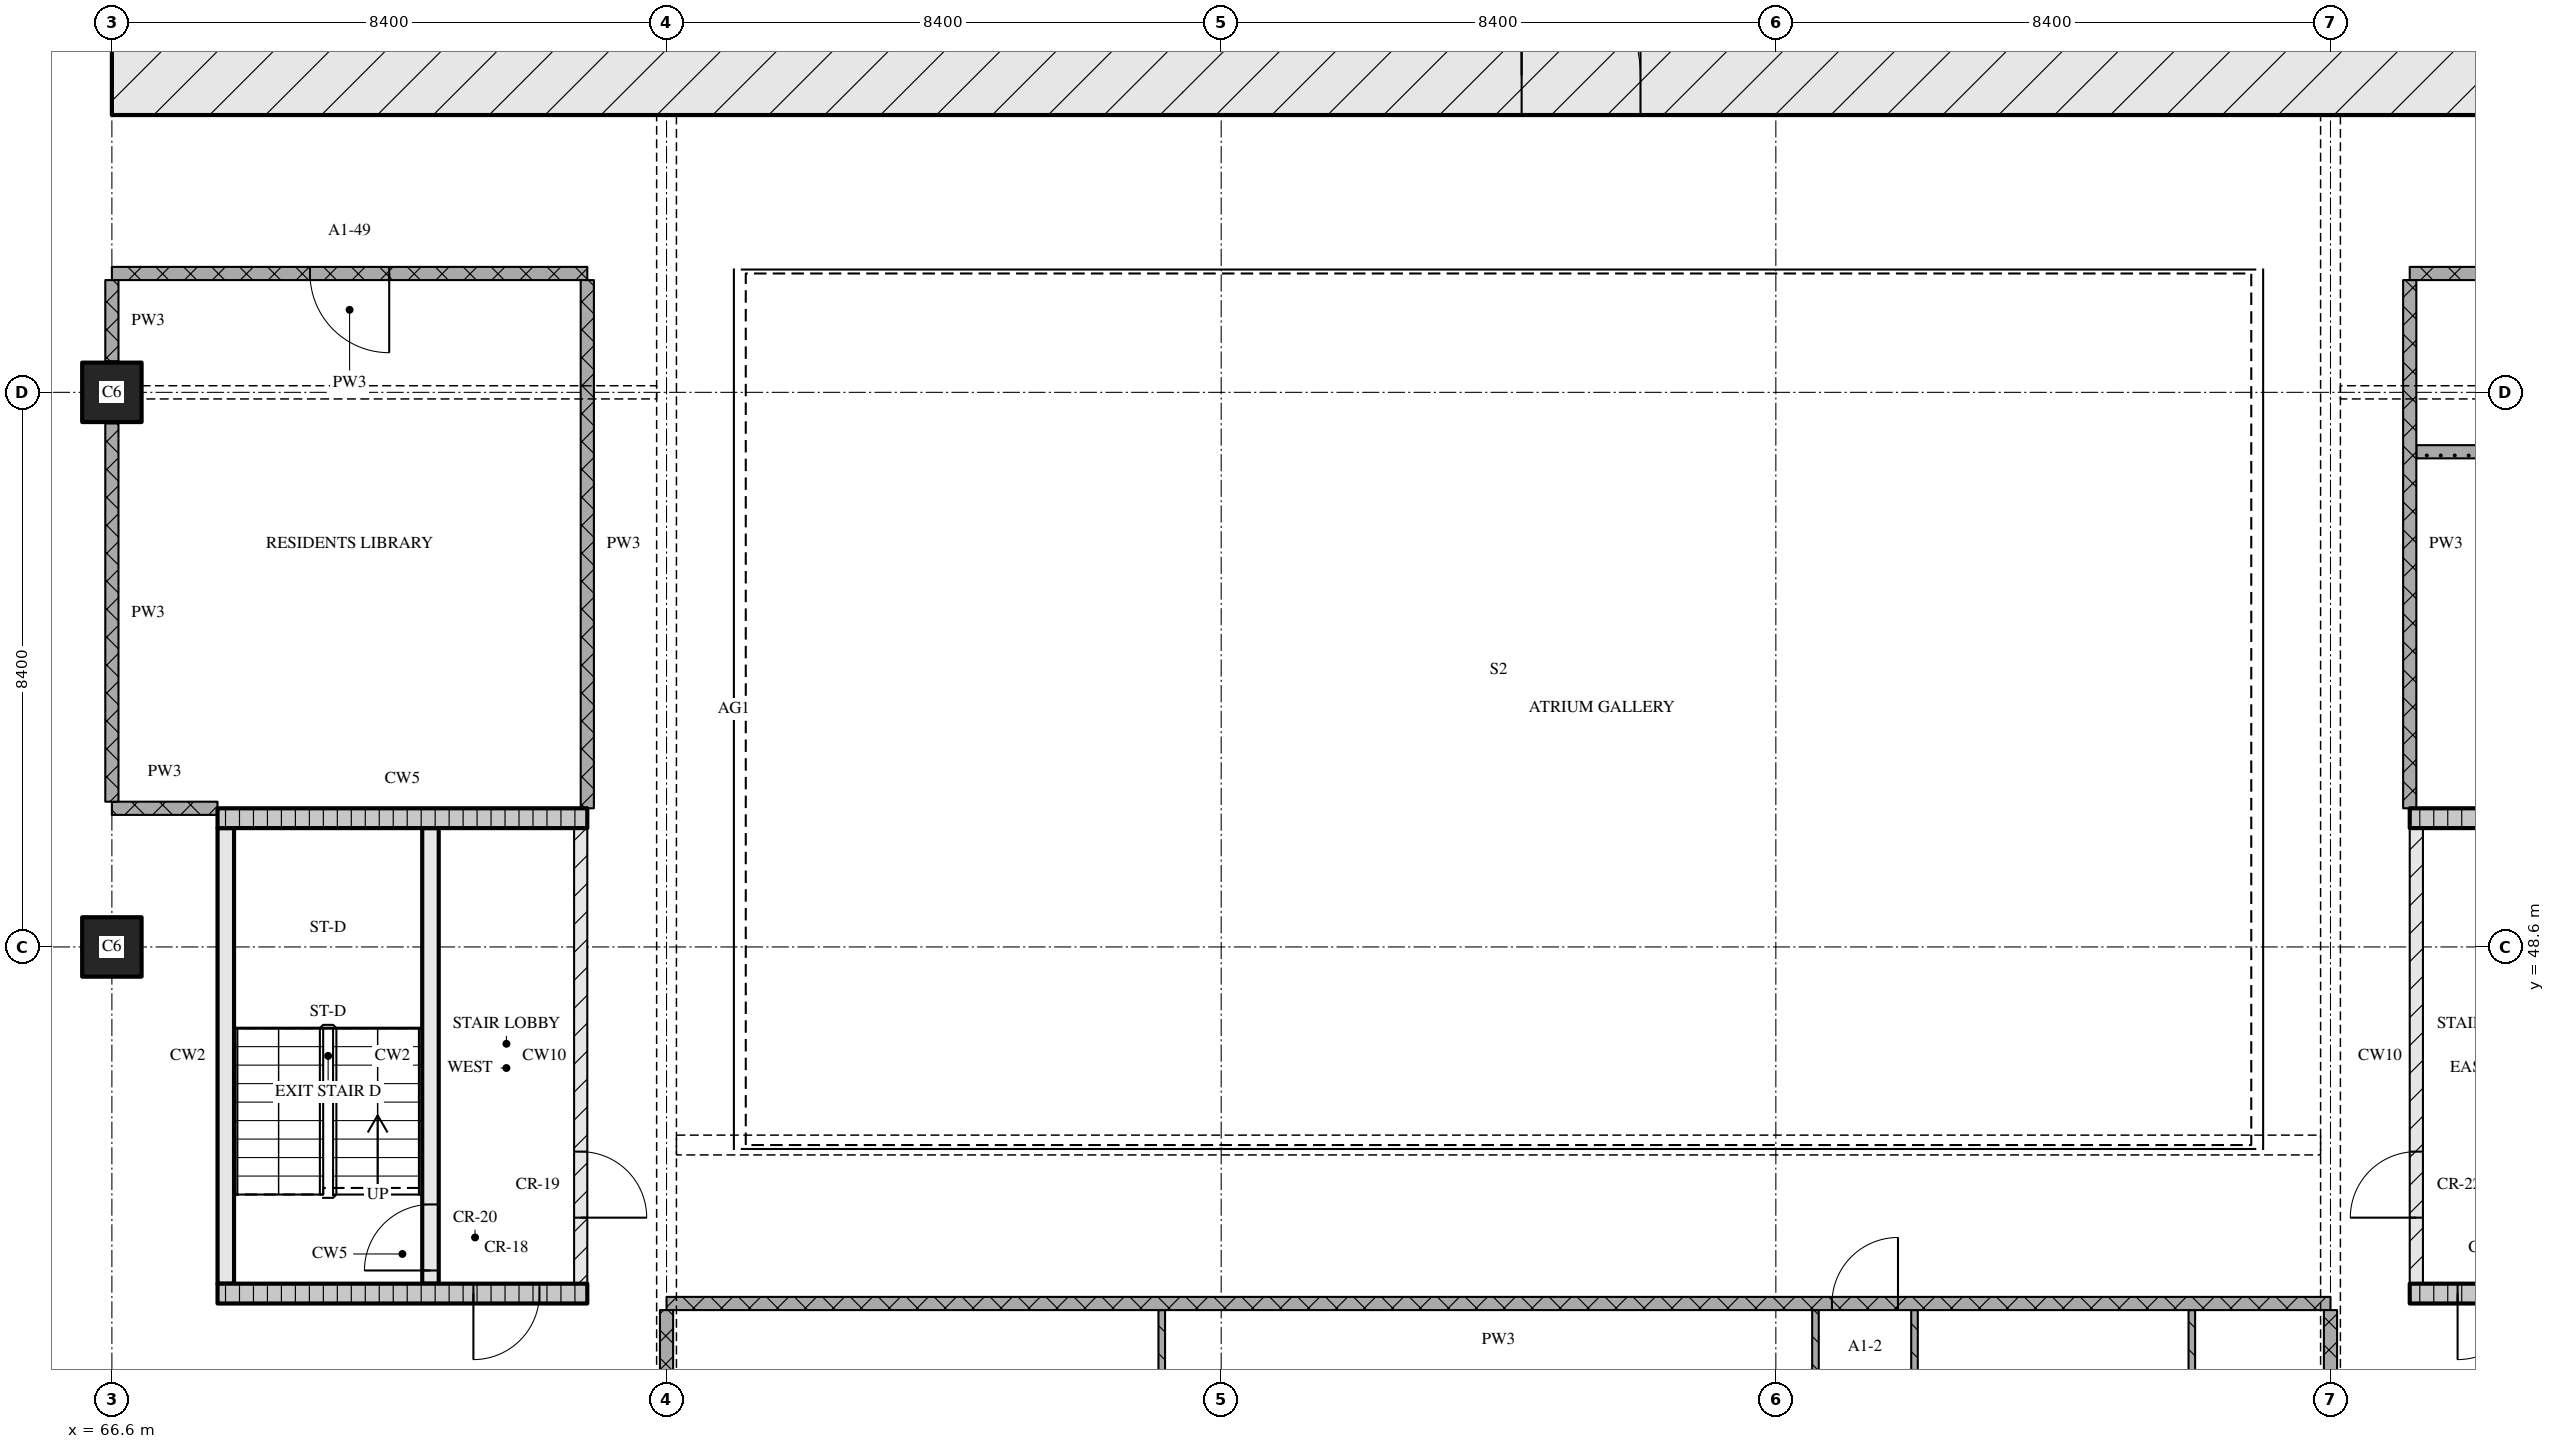
"""IFC4 building model, lengths in metres.
Left out: names, types, materials, properties, quantities, classifications, styles, units other than length and angle.
Written with IfcOpenShell. Run it as: python <this file> out.ifc"""

import sys

from ifc_helpers import new_model, si_unit, direction, frame, frame_2d, origin, origin_2d, place, context, subcontext, project, spatial, rectangle, extrude, element, fill, save


model = new_model("IFC4")
c1 = context("Model", 3, precision=1e-05, world=origin(), true_north=direction((0.0, 1.0)))
c2 = subcontext(c1, "Body", "Model", "MODEL_VIEW")
j1 = project(units=[si_unit("LENGTHUNIT", "METRE"), si_unit("PLANEANGLEUNIT", "RADIAN")], contexts=[c1])
p1 = place(None, origin())
s1 = spatial("IfcSite", under=j1, at=p1, CompositionType="ELEMENT")
p2 = place(p1, origin())
s2 = spatial("IfcBuilding", under=s1, at=p2, CompositionType="ELEMENT")
p3 = place(p2, frame((0.0, 0.0, 40.8)))
s3 = spatial("IfcBuildingStorey", under=s2, at=p3, CompositionType="ELEMENT", Elevation=40.8)
for number, where, z_axis, x_axis in (
    (1, (66.6, 48.6, 0.0), (0.0, 0.0, 1.0), (1.0, 0.0, 0.0)),
    (2, (66.6, 57.0, 0.0), (0.0, 0.0, 1.0), (1.0, 0.0, 0.0)),
):
    element("IfcColumn", number, at=place(p3, frame(where, z_axis=z_axis, x_axis=x_axis)), inside=s3, PredefinedType="COLUMN", context=c2, shape_type="SweptSolid", body=[
        extrude(rectangle(XDim=0.9, YDim=0.9, at=origin_2d()), origin(), (0.0, 0.0, 1.0), 3.6),
    ])
p4 = place(p3, frame((66.6, 61.8, 0.0), z_axis=(0.0, 0.0, 1.0), x_axis=(1.0, 0.0, 0.0)))
e3 = element("IfcWall", 3, at=p4, inside=s3, PredefinedType="SOLIDWALL", context=c2, shape_type="SweptSolid", body=[
    extrude(rectangle(XDim=42.0, YDim=1.2, at=frame_2d((21.0, 0.0))), origin(), (0.0, 0.0, 1.0), 3.32),
])
p5 = place(p4, frame((21.35, 0.0, 0.0)))
e4 = element("IfcOpeningElement", 4, at=p5, cuts=e3, PredefinedType="OPENING", context=c2, shape_type="SweptSolid", body=[
    extrude(rectangle(XDim=1.8, YDim=2.1, at=frame_2d((0.9, 1.05))), frame((0.0, 0.61, 0.0), z_axis=(0.0, -1.0, 0.0), x_axis=(1.0, 0.0, 0.0)), (0.0, 0.0, 1.0), 1.22),
])
p6 = place(p3, frame((68.2, 43.35, 0.0), z_axis=(0.0, 0.0, 1.0), x_axis=(1.0, 0.0, 0.0)))
e5 = element("IfcWall", 5, at=p6, inside=s3, PredefinedType="SOLIDWALL", context=c2, shape_type="SweptSolid", body=[
    extrude(rectangle(XDim=5.6, YDim=0.3, at=frame_2d((2.8, 0.0))), origin(), (0.0, 0.0, 1.0), 3.32),
])
p7 = place(p6, frame((3.875, 0.0, 0.0)))
e6 = element("IfcOpeningElement", 6, at=p7, cuts=e5, PredefinedType="OPENING", context=c2, shape_type="SweptSolid", body=[
    extrude(rectangle(XDim=1.0, YDim=2.1, at=frame_2d((0.5, 1.05))), frame((0.0, 0.16, 0.0), z_axis=(0.0, -1.0, 0.0), x_axis=(1.0, 0.0, 0.0)), (0.0, 0.0, 1.0), 0.32),
])
p8 = place(p3, frame((68.325, 43.5, 0.0), z_axis=(0.0, 0.0, 1.0), x_axis=(0.0, 1.0, 0.0)))
e7 = element("IfcWall", 7, at=p8, inside=s3, PredefinedType="SOLIDWALL", context=c2, shape_type="SweptSolid", body=[
    extrude(rectangle(XDim=6.9, YDim=0.25, at=frame_2d((3.45, 0.0))), origin(), (0.0, 0.0, 1.0), 3.32),
])
p9 = place(p3, frame((71.425, 43.5, 0.0), z_axis=(0.0, 0.0, 1.0), x_axis=(0.0, 1.0, 0.0)))
e8 = element("IfcWall", 8, at=p9, inside=s3, PredefinedType="SOLIDWALL", context=c2, shape_type="SweptSolid", body=[
    extrude(rectangle(XDim=6.9, YDim=0.25, at=frame_2d((3.45, 0.0))), origin(), (0.0, 0.0, 1.0), 3.32),
])
p10 = place(p9, frame((0.2, 0.0, 0.0)))
e9 = element("IfcOpeningElement", 9, at=p10, cuts=e8, PredefinedType="OPENING", context=c2, shape_type="SweptSolid", body=[
    extrude(rectangle(XDim=1.0, YDim=2.1, at=frame_2d((0.5, 1.05))), frame((0.0, 0.135, 0.0), z_axis=(0.0, -1.0, 0.0), x_axis=(1.0, 0.0, 0.0)), (0.0, 0.0, 1.0), 0.27),
])
p11 = place(p3, frame((73.7, 43.5, 0.0), z_axis=(0.0, 0.0, 1.0), x_axis=(0.0, 1.0, 0.0)))
e10 = element("IfcWall", 10, at=p11, inside=s3, PredefinedType="PARTITIONING", context=c2, shape_type="SweptSolid", body=[
    extrude(rectangle(XDim=6.9, YDim=0.2, at=frame_2d((3.45, 0.0))), origin(), (0.0, 0.0, 1.0), 3.32),
])
p12 = place(p11, frame((1.0, 0.0, 0.0)))
e11 = element("IfcOpeningElement", 11, at=p12, cuts=e10, PredefinedType="OPENING", context=c2, shape_type="SweptSolid", body=[
    extrude(rectangle(XDim=1.0, YDim=2.1, at=frame_2d((0.5, 1.05))), frame((0.0, 0.11, 0.0), z_axis=(0.0, -1.0, 0.0), x_axis=(1.0, 0.0, 0.0)), (0.0, 0.0, 1.0), 0.22),
])
p13 = place(p3, frame((68.2, 50.55, 0.0), z_axis=(0.0, 0.0, 1.0), x_axis=(1.0, 0.0, 0.0)))
e12 = element("IfcWall", 12, at=p13, inside=s3, PredefinedType="SOLIDWALL", context=c2, shape_type="SweptSolid", body=[
    extrude(rectangle(XDim=5.6, YDim=0.3, at=frame_2d((2.8, 0.0))), origin(), (0.0, 0.0, 1.0), 3.32),
])
p14 = place(p3, frame((101.4, 43.35, 0.0), z_axis=(0.0, 0.0, 1.0), x_axis=(1.0, 0.0, 0.0)))
e13 = element("IfcWall", 13, at=p14, inside=s3, PredefinedType="SOLIDWALL", context=c2, shape_type="SweptSolid", body=[
    extrude(rectangle(XDim=5.6, YDim=0.3, at=frame_2d((2.8, 0.0))), origin(), (0.0, 0.0, 1.0), 3.32),
])
p15 = place(p14, frame((0.725, 0.0, 0.0)))
e14 = element("IfcOpeningElement", 14, at=p15, cuts=e13, PredefinedType="OPENING", context=c2, shape_type="SweptSolid", body=[
    extrude(rectangle(XDim=1.0, YDim=2.1, at=frame_2d((0.5, 1.05))), frame((0.0, 0.16, 0.0), z_axis=(0.0, -1.0, 0.0), x_axis=(1.0, 0.0, 0.0)), (0.0, 0.0, 1.0), 0.32),
])
p16 = place(p3, frame((101.5, 43.5, 0.0), z_axis=(0.0, 0.0, 1.0), x_axis=(0.0, 1.0, 0.0)))
e15 = element("IfcWall", 15, at=p16, inside=s3, PredefinedType="PARTITIONING", context=c2, shape_type="SweptSolid", body=[
    extrude(rectangle(XDim=6.9, YDim=0.2, at=frame_2d((3.45, 0.0))), origin(), (0.0, 0.0, 1.0), 3.32),
])
p17 = place(p16, frame((1.0, 0.0, 0.0)))
e16 = element("IfcOpeningElement", 16, at=p17, cuts=e15, PredefinedType="OPENING", context=c2, shape_type="SweptSolid", body=[
    extrude(rectangle(XDim=1.0, YDim=2.1, at=frame_2d((0.5, 1.05))), frame((0.0, 0.11, 0.0), z_axis=(0.0, -1.0, 0.0), x_axis=(1.0, 0.0, 0.0)), (0.0, 0.0, 1.0), 0.22),
])
p18 = place(p3, frame((101.4, 50.55, 0.0), z_axis=(0.0, 0.0, 1.0), x_axis=(1.0, 0.0, 0.0)))
e17 = element("IfcWall", 17, at=p18, inside=s3, PredefinedType="SOLIDWALL", context=c2, shape_type="SweptSolid", body=[
    extrude(rectangle(XDim=5.6, YDim=0.3, at=frame_2d((2.8, 0.0))), origin(), (0.0, 0.0, 1.0), 3.32),
])
p19 = place(p3, frame((100.2, 43.2, 0.0), z_axis=(0.0, 0.0, 1.0), x_axis=(-1.0, 0.0, 0.0)))
e18 = element("IfcWall", 18, at=p19, inside=s3, PredefinedType="PARTITIONING", context=c2, shape_type="SweptSolid", body=[
    extrude(rectangle(XDim=25.2, YDim=0.2, at=frame_2d((12.6, 0.0))), origin(), (0.0, 0.0, 1.0), 3.32),
])
p20 = place(p19, frame((6.55, 0.0, 0.0)))
e19 = element("IfcOpeningElement", 19, at=p20, cuts=e18, PredefinedType="OPENING", context=c2, shape_type="SweptSolid", body=[
    extrude(rectangle(XDim=1.0, YDim=2.1, at=frame_2d((0.5, 1.05))), frame((0.0, 0.11, 0.0), z_axis=(0.0, -1.0, 0.0), x_axis=(1.0, 0.0, 0.0)), (0.0, 0.0, 1.0), 0.22),
])
p21 = place(p3, frame((66.6, 50.7, 0.0), z_axis=(0.0, 0.0, 1.0), x_axis=(1.0, 0.0, 0.0)))
e20 = element("IfcWall", 20, at=p21, inside=s3, PredefinedType="PARTITIONING", context=c2, shape_type="SweptSolid", body=[
    extrude(rectangle(XDim=1.6, YDim=0.2, at=frame_2d((0.8, 0.0))), origin(), (0.0, 0.0, 1.0), 3.32),
])
p22 = place(p3, frame((101.5, 56.1, 0.0), z_axis=(0.0, 0.0, 1.0), x_axis=(1.0, 0.0, 0.0)))
e21 = element("IfcWall", 21, at=p22, inside=s3, PredefinedType="PARTITIONING", context=c2, shape_type="SweptSolid", body=[
    extrude(rectangle(XDim=7.0, YDim=0.2, at=frame_2d((3.5, 0.0))), origin(), (0.0, 0.0, 1.0), 3.32),
])
p23 = place(p3, frame((73.8, 58.8, 0.0), z_axis=(0.0, 0.0, 1.0), x_axis=(-1.0, 0.0, 0.0)))
e22 = element("IfcWall", 22, at=p23, inside=s3, PredefinedType="PARTITIONING", context=c2, shape_type="SweptSolid", body=[
    extrude(rectangle(XDim=7.2, YDim=0.2, at=frame_2d((3.6, 0.0))), origin(), (0.0, 0.0, 1.0), 3.32),
])
p24 = place(p23, frame((3.0, 0.0, 0.0)))
e23 = element("IfcOpeningElement", 23, at=p24, cuts=e22, PredefinedType="OPENING", context=c2, shape_type="SweptSolid", body=[
    extrude(rectangle(XDim=1.2, YDim=2.1, at=frame_2d((0.6, 1.05))), frame((0.0, 0.11, 0.0), z_axis=(0.0, -1.0, 0.0), x_axis=(1.0, 0.0, 0.0)), (0.0, 0.0, 1.0), 0.22),
])
p25 = place(p3, frame((101.4, 58.8, 0.0), z_axis=(0.0, 0.0, 1.0), x_axis=(1.0, 0.0, 0.0)))
e24 = element("IfcWall", 24, at=p25, inside=s3, PredefinedType="PARTITIONING", context=c2, shape_type="SweptSolid", body=[
    extrude(rectangle(XDim=7.2, YDim=0.2, at=frame_2d((3.6, 0.0))), origin(), (0.0, 0.0, 1.0), 3.32),
])
p26 = place(p3, frame((66.6, 56.53, 0.0), z_axis=(0.0, 0.0, 1.0), x_axis=(0.0, -1.0, 0.0)))
e25 = element("IfcWall", 25, at=p26, inside=s3, PredefinedType="PARTITIONING", context=c2, shape_type="SweptSolid", body=[
    extrude(rectangle(XDim=5.73, YDim=0.2, at=frame_2d((2.865, 0.0))), origin(), (0.0, 0.0, 1.0), 3.32),
])
p27 = place(p3, frame((66.6, 58.7, 0.0), z_axis=(0.0, 0.0, 1.0), x_axis=(0.0, -1.0, 0.0)))
e26 = element("IfcWall", 26, at=p27, inside=s3, PredefinedType="PARTITIONING", context=c2, shape_type="SweptSolid", body=[
    extrude(rectangle(XDim=1.23, YDim=0.2, at=frame_2d((0.615, 0.0))), origin(), (0.0, 0.0, 1.0), 3.32),
])
p28 = place(p3, frame((73.8, 58.7, 0.0), z_axis=(0.0, 0.0, 1.0), x_axis=(0.0, -1.0, 0.0)))
e27 = element("IfcWall", 27, at=p28, inside=s3, PredefinedType="PARTITIONING", context=c2, shape_type="SweptSolid", body=[
    extrude(rectangle(XDim=8.0, YDim=0.2, at=frame_2d((4.0, 0.0))), origin(), (0.0, 0.0, 1.0), 3.32),
])
p29 = place(p3, frame((75.0, 43.1, 0.0), z_axis=(0.0, 0.0, 1.0), x_axis=(0.0, -1.0, 0.0)))
e28 = element("IfcWall", 28, at=p29, inside=s3, PredefinedType="PARTITIONING", context=c2, shape_type="SweptSolid", body=[
    extrude(rectangle(XDim=2.2, YDim=0.2, at=frame_2d((1.1, 0.0))), origin(), (0.0, 0.0, 1.0), 2.43),
])
p30 = place(p3, frame((82.5, 43.1, 0.0), z_axis=(0.0, 0.0, 1.0), x_axis=(0.0, -1.0, 0.0)))
e29 = element("IfcWall", 29, at=p30, inside=s3, PredefinedType="PARTITIONING", context=c2, shape_type="SweptSolid", body=[
    extrude(rectangle(XDim=4.35, YDim=0.1, at=frame_2d((2.175, 0.0))), origin(), (0.0, 0.0, 1.0), 3.32),
])
p31 = place(p3, frame((92.4, 38.75, 0.0), z_axis=(0.0, 0.0, 1.0), x_axis=(0.0, 1.0, 0.0)))
e30 = element("IfcWall", 30, at=p31, inside=s3, PredefinedType="PARTITIONING", context=c2, shape_type="SweptSolid", body=[
    extrude(rectangle(XDim=4.35, YDim=0.1, at=frame_2d((2.175, 0.0))), origin(), (0.0, 0.0, 1.0), 3.32),
])
p32 = place(p31, frame((2.05, 0.0, 0.0)))
e31 = element("IfcOpeningElement", 31, at=p32, cuts=e30, PredefinedType="OPENING", context=c2, shape_type="SweptSolid", body=[
    extrude(rectangle(XDim=0.9, YDim=2.1, at=frame_2d((0.45, 1.05))), frame((0.0, 0.06, 0.0), z_axis=(0.0, -1.0, 0.0), x_axis=(1.0, 0.0, 0.0)), (0.0, 0.0, 1.0), 0.12),
])
p33 = place(p3, frame((93.9, 43.1, 0.0), z_axis=(0.0, 0.0, 1.0), x_axis=(0.0, -1.0, 0.0)))
e32 = element("IfcWall", 32, at=p33, inside=s3, PredefinedType="PARTITIONING", context=c2, shape_type="SweptSolid", body=[
    extrude(rectangle(XDim=4.35, YDim=0.1, at=frame_2d((2.175, 0.0))), origin(), (0.0, 0.0, 1.0), 3.32),
])
p34 = place(p33, frame((1.75, 0.0, 0.0)))
e33 = element("IfcOpeningElement", 33, at=p34, cuts=e32, PredefinedType="OPENING", context=c2, shape_type="SweptSolid", body=[
    extrude(rectangle(XDim=0.8, YDim=2.1, at=frame_2d((0.4, 1.05))), frame((0.0, 0.06, 0.0), z_axis=(0.0, -1.0, 0.0), x_axis=(1.0, 0.0, 0.0)), (0.0, 0.0, 1.0), 0.12),
])
p35 = place(p3, frame((98.1, 43.1, 0.0), z_axis=(0.0, 0.0, 1.0), x_axis=(0.0, -1.0, 0.0)))
e34 = element("IfcWall", 34, at=p35, inside=s3, PredefinedType="PARTITIONING", context=c2, shape_type="SweptSolid", body=[
    extrude(rectangle(XDim=4.35, YDim=0.1, at=frame_2d((2.175, 0.0))), origin(), (0.0, 0.0, 1.0), 3.32),
])
p36 = place(p3, frame((100.2, 43.1, 0.0), z_axis=(0.0, 0.0, 1.0), x_axis=(0.0, -1.0, 0.0)))
e35 = element("IfcWall", 35, at=p36, inside=s3, PredefinedType="PARTITIONING", context=c2, shape_type="SweptSolid", body=[
    extrude(rectangle(XDim=2.2, YDim=0.2, at=frame_2d((1.1, 0.0))), origin(), (0.0, 0.0, 1.0), 2.43),
])
p37 = place(p3, frame((101.4, 58.7, 0.0), z_axis=(0.0, 0.0, 1.0), x_axis=(0.0, -1.0, 0.0)))
e36 = element("IfcWall", 36, at=p37, inside=s3, PredefinedType="PARTITIONING", context=c2, shape_type="SweptSolid", body=[
    extrude(rectangle(XDim=8.0, YDim=0.2, at=frame_2d((4.0, 0.0))), origin(), (0.0, 0.0, 1.0), 3.32),
])
p38 = place(p5, origin())
e37 = element("IfcDoor", 37, at=p38, inside=s3, OperationType="DOUBLE_DOOR_SINGLE_SWING", PredefinedType="DOOR", context=c2, shape_type="SweptSolid", body=[
    extrude(rectangle(XDim=1.8, YDim=2.1, at=frame_2d((0.9, 1.05))), frame((0.0, 0.025, 0.0), z_axis=(0.0, -1.0, 0.0), x_axis=(1.0, 0.0, 0.0)), (0.0, 0.0, 1.0), 0.05),
])
fill(e4, e37)
p39 = place(p7, origin())
e38 = element("IfcDoor", 38, at=p39, inside=s3, OperationType="SINGLE_SWING_RIGHT", PredefinedType="DOOR", context=c2, shape_type="SweptSolid", body=[
    extrude(rectangle(XDim=1.0, YDim=2.1, at=frame_2d((0.5, 1.05))), frame((0.0, 0.025, 0.0), z_axis=(0.0, -1.0, 0.0), x_axis=(1.0, 0.0, 0.0)), (0.0, 0.0, 1.0), 0.05),
])
fill(e6, e38)
p40 = place(p10, origin())
e39 = element("IfcDoor", 39, at=p40, inside=s3, OperationType="SINGLE_SWING_LEFT", PredefinedType="DOOR", context=c2, shape_type="SweptSolid", body=[
    extrude(rectangle(XDim=1.0, YDim=2.1, at=frame_2d((0.5, 1.05))), frame((0.0, 0.025, 0.0), z_axis=(0.0, -1.0, 0.0), x_axis=(1.0, 0.0, 0.0)), (0.0, 0.0, 1.0), 0.05),
])
fill(e9, e39)
p41 = place(p12, origin())
e40 = element("IfcDoor", 40, at=p41, inside=s3, OperationType="SINGLE_SWING_RIGHT", PredefinedType="DOOR", context=c2, shape_type="SweptSolid", body=[
    extrude(rectangle(XDim=1.0, YDim=2.1, at=frame_2d((0.5, 1.05))), frame((0.0, 0.025, 0.0), z_axis=(0.0, -1.0, 0.0), x_axis=(1.0, 0.0, 0.0)), (0.0, 0.0, 1.0), 0.05),
])
fill(e11, e40)
p42 = place(p15, origin())
e41 = element("IfcDoor", 41, at=p42, inside=s3, OperationType="SINGLE_SWING_RIGHT", PredefinedType="DOOR", context=c2, shape_type="SweptSolid", body=[
    extrude(rectangle(XDim=1.0, YDim=2.1, at=frame_2d((0.5, 1.05))), frame((0.0, 0.025, 0.0), z_axis=(0.0, -1.0, 0.0), x_axis=(1.0, 0.0, 0.0)), (0.0, 0.0, 1.0), 0.05),
])
fill(e14, e41)
p43 = place(p17, origin())
e42 = element("IfcDoor", 42, at=p43, inside=s3, OperationType="SINGLE_SWING_LEFT", PredefinedType="DOOR", context=c2, shape_type="SweptSolid", body=[
    extrude(rectangle(XDim=1.0, YDim=2.1, at=frame_2d((0.5, 1.05))), frame((0.0, 0.025, 0.0), z_axis=(0.0, -1.0, 0.0), x_axis=(1.0, 0.0, 0.0)), (0.0, 0.0, 1.0), 0.05),
])
fill(e16, e42)
p44 = place(p20, origin())
e43 = element("IfcDoor", 43, at=p44, inside=s3, OperationType="SINGLE_SWING_RIGHT", PredefinedType="DOOR", context=c2, shape_type="SweptSolid", body=[
    extrude(rectangle(XDim=1.0, YDim=2.1, at=frame_2d((0.5, 1.05))), frame((0.0, 0.025, 0.0), z_axis=(0.0, -1.0, 0.0), x_axis=(1.0, 0.0, 0.0)), (0.0, 0.0, 1.0), 0.05),
])
fill(e19, e43)
p45 = place(p24, origin())
e44 = element("IfcDoor", 44, at=p45, inside=s3, OperationType="SINGLE_SWING_LEFT", PredefinedType="DOOR", context=c2, shape_type="SweptSolid", body=[
    extrude(rectangle(XDim=1.2, YDim=2.1, at=frame_2d((0.6, 1.05))), frame((0.0, 0.025, 0.0), z_axis=(0.0, -1.0, 0.0), x_axis=(1.0, 0.0, 0.0)), (0.0, 0.0, 1.0), 0.05),
])
fill(e23, e44)
save(model, sys.argv[1])
